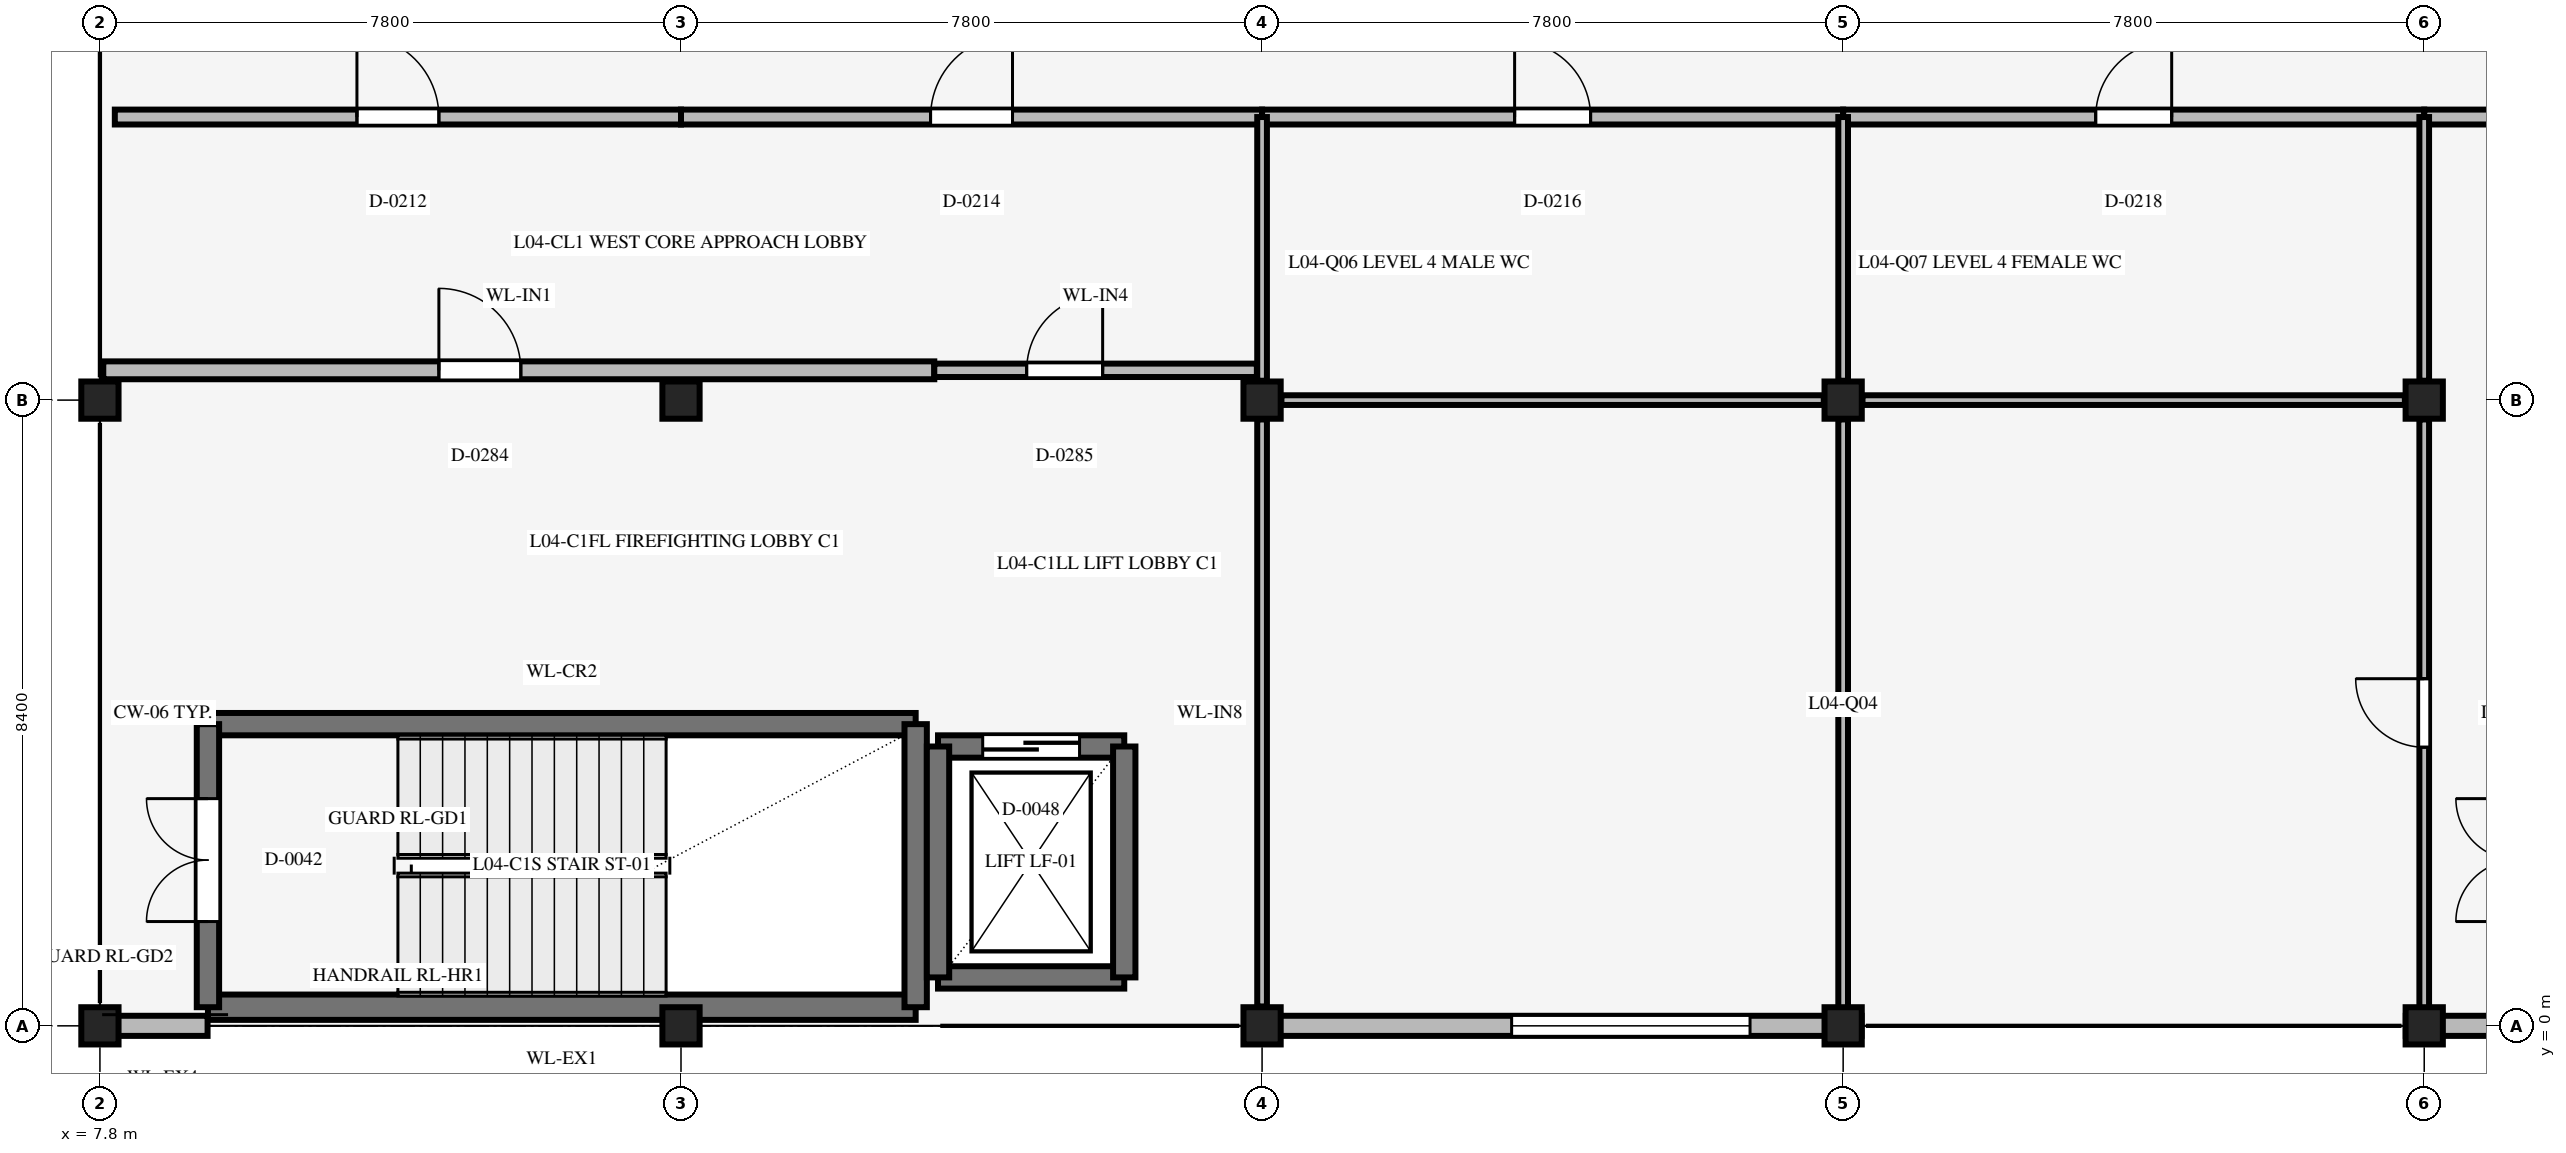
"""IFC4 building model, lengths in metres.
Left out: names, types, materials, properties, quantities, classifications, styles, units other than length and angle.
Written with IfcOpenShell. Run it as: python <this file> out.ifc"""

import sys

from ifc_helpers import new_model, si_unit, direction, frame, frame_2d, origin, origin_2d, place, context, subcontext, project, spatial, rectangle, extrude, element, fill, save


model = new_model("IFC4")
c1 = context("Model", 3, precision=1e-05, world=origin(), true_north=direction((0.0, 1.0)))
c2 = subcontext(c1, "Body", "Model", "MODEL_VIEW")
j1 = project(units=[si_unit("LENGTHUNIT", "METRE"), si_unit("PLANEANGLEUNIT", "RADIAN")], contexts=[c1])
p1 = place(None, origin())
s1 = spatial("IfcSite", under=j1, at=p1, CompositionType="ELEMENT")
p2 = place(p1, origin())
s2 = spatial("IfcBuilding", under=s1, at=p2, CompositionType="ELEMENT")
p3 = place(p2, frame((0.0, 0.0, 19.8)))
s3 = spatial("IfcBuildingStorey", under=s2, at=p3, CompositionType="ELEMENT", Elevation=19.8)
for number, where, z_axis, x_axis in (
    (1, (7.8, 0.0, 0.0), (0.0, 0.0, 1.0), (1.0, 0.0, 0.0)),
    (2, (7.8, 8.4, 0.0), (0.0, 0.0, 1.0), (1.0, 0.0, 0.0)),
    (3, (15.6, 0.0, 0.0), (0.0, 0.0, 1.0), (1.0, 0.0, 0.0)),
    (4, (15.6, 8.4, 0.0), (0.0, 0.0, 1.0), (1.0, 0.0, 0.0)),
    (5, (23.4, 0.0, 0.0), (0.0, 0.0, 1.0), (1.0, 0.0, 0.0)),
    (6, (23.4, 8.4, 0.0), (0.0, 0.0, 1.0), (1.0, 0.0, 0.0)),
    (7, (31.2, 0.0, 0.0), (0.0, 0.0, 1.0), (1.0, 0.0, 0.0)),
    (8, (31.2, 8.4, 0.0), (0.0, 0.0, 1.0), (1.0, 0.0, 0.0)),
    (9, (39.0, 0.0, 0.0), (0.0, 0.0, 1.0), (1.0, 0.0, 0.0)),
    (10, (39.0, 8.4, 0.0), (0.0, 0.0, 1.0), (1.0, 0.0, 0.0)),
):
    element("IfcColumn", number, at=place(p3, frame(where, z_axis=z_axis, x_axis=x_axis)), inside=s3, PredefinedType="COLUMN", context=c2, shape_type="SweptSolid", body=[
        extrude(rectangle(XDim=0.5, YDim=0.5, at=origin_2d()), origin(), (0.0, 0.0, 1.0), 3.9),
    ])
p4 = place(p3, frame((18.75, 0.25, 0.0), z_axis=(0.0, 0.0, 1.0), x_axis=(-1.0, 0.0, 0.0)))
e11 = element("IfcWall", 11, at=p4, inside=s3, PredefinedType="STANDARD", context=c2, shape_type="SweptSolid", body=[
    extrude(rectangle(XDim=9.5, YDim=0.34, at=frame_2d((4.75, 0.0))), origin(), (0.0, 0.0, 1.0), 3.9),
])
p5 = place(p3, frame((9.25, 4.05, 0.0), z_axis=(0.0, 0.0, 1.0), x_axis=(1.0, 0.0, 0.0)))
e12 = element("IfcWall", 12, at=p5, inside=s3, PredefinedType="SHEAR", context=c2, shape_type="SweptSolid", body=[
    extrude(rectangle(XDim=9.5, YDim=0.3, at=frame_2d((4.75, 0.0))), origin(), (0.0, 0.0, 1.0), 3.9),
])
p6 = place(p3, frame((9.25, 0.25, 0.0), z_axis=(0.0, 0.0, 1.0), x_axis=(0.0, 1.0, 0.0)))
e13 = element("IfcWall", 13, at=p6, inside=s3, PredefinedType="SHEAR", context=c2, shape_type="SweptSolid", body=[
    extrude(rectangle(XDim=3.8, YDim=0.3, at=frame_2d((1.9, 0.0))), origin(), (0.0, 0.0, 1.0), 3.9),
])
p7 = place(p6, frame((1.15, 0.0, 0.0)))
e14 = element("IfcOpeningElement", 14, at=p7, cuts=e13, PredefinedType="OPENING", context=c2, shape_type="SweptSolid", body=[
    extrude(rectangle(XDim=1.65, YDim=2.2, at=frame_2d((0.825, 1.1))), frame((0.0, 0.16, 0.0), z_axis=(0.0, -1.0, 0.0), x_axis=(1.0, 0.0, 0.0)), (0.0, 0.0, 1.0), 0.32),
])
p8 = place(p3, frame((18.75, 0.25, 0.0), z_axis=(0.0, 0.0, 1.0), x_axis=(0.0, 1.0, 0.0)))
e15 = element("IfcWall", 15, at=p8, inside=s3, PredefinedType="SHEAR", context=c2, shape_type="SweptSolid", body=[
    extrude(rectangle(XDim=3.8, YDim=0.3, at=frame_2d((1.9, 0.0))), origin(), (0.0, 0.0, 1.0), 3.9),
])
p9 = place(p3, frame((19.05, 0.65, 0.0), z_axis=(0.0, 0.0, 1.0), x_axis=(1.0, 0.0, 0.0)))
e16 = element("IfcWall", 16, at=p9, inside=s3, PredefinedType="SHEAR", context=c2, shape_type="SweptSolid", body=[
    extrude(rectangle(XDim=2.5, YDim=0.3, at=frame_2d((1.25, 0.0))), origin(), (0.0, 0.0, 1.0), 3.6),
])
p10 = place(p3, frame((19.05, 3.75, 0.0), z_axis=(0.0, 0.0, 1.0), x_axis=(1.0, 0.0, 0.0)))
e17 = element("IfcWall", 17, at=p10, inside=s3, PredefinedType="SHEAR", context=c2, shape_type="SweptSolid", body=[
    extrude(rectangle(XDim=2.5, YDim=0.3, at=frame_2d((1.25, 0.0))), origin(), (0.0, 0.0, 1.0), 3.6),
])
p11 = place(p10, frame((0.6, 0.0, 0.0)))
e18 = element("IfcOpeningElement", 18, at=p11, cuts=e17, PredefinedType="OPENING", context=c2, shape_type="SweptSolid", body=[
    extrude(rectangle(XDim=1.3, YDim=2.2, at=frame_2d((0.65, 1.1))), frame((0.0, 0.16, 0.0), z_axis=(0.0, -1.0, 0.0), x_axis=(1.0, 0.0, 0.0)), (0.0, 0.0, 1.0), 0.32),
])
for number, where, z_axis, x_axis in (
    (19, (19.05, 0.65, 0.0), (0.0, 0.0, 1.0), (0.0, 1.0, 0.0)),
    (20, (21.55, 0.65, 0.0), (0.0, 0.0, 1.0), (0.0, 1.0, 0.0)),
):
    element("IfcWall", number, at=place(p3, frame(where, z_axis=z_axis, x_axis=x_axis)), inside=s3, PredefinedType="SHEAR", context=c2, shape_type="SweptSolid", body=[
        extrude(rectangle(XDim=3.1, YDim=0.3, at=frame_2d((1.55, 0.0))), origin(), (0.0, 0.0, 1.0), 3.6),
    ])
p12 = place(p3, frame((9.245, 0.0, 0.0), z_axis=(0.0, 0.0, 1.0), x_axis=(-1.0, 0.0, 0.0)))
e21 = element("IfcWall", 21, at=p12, inside=s3, PredefinedType="STANDARD", context=c2, shape_type="SweptSolid", body=[
    extrude(rectangle(XDim=1.205, YDim=0.27, at=frame_2d((0.603, 0.0))), origin(), (0.0, 0.0, 1.0), 4.8),
])
p13 = place(p3, frame((31.448, 0.0, 0.0), z_axis=(0.0, 0.0, 1.0), x_axis=(-1.0, 0.0, 0.0)))
e22 = element("IfcWall", 22, at=p13, inside=s3, PredefinedType="STANDARD", context=c2, shape_type="SweptSolid", body=[
    extrude(rectangle(XDim=7.808, YDim=0.27, at=frame_2d((3.904, 0.0))), origin(), (0.0, 0.0, 1.0), 3.231),
])
p14 = place(p13, frame((1.498, 0.0, 0.9)))
e23 = element("IfcOpeningElement", 23, at=p14, cuts=e22, PredefinedType="OPENING", context=c2, shape_type="SweptSolid", body=[
    extrude(rectangle(XDim=3.2, YDim=2.1, at=frame_2d((1.6, 1.05))), frame((0.0, 0.145, 0.0), z_axis=(0.0, -1.0, 0.0), x_axis=(1.0, 0.0, 0.0)), (0.0, 0.0, 1.0), 0.29),
])
p15 = place(p3, frame((40.245, 0.0, 0.0), z_axis=(0.0, 0.0, 1.0), x_axis=(-1.0, 0.0, 0.0)))
e24 = element("IfcWall", 24, at=p15, inside=s3, PredefinedType="STANDARD", context=c2, shape_type="SweptSolid", body=[
    extrude(rectangle(XDim=1.493, YDim=0.27, at=frame_2d((0.746, 0.0))), origin(), (0.0, 0.0, 1.0), 4.8),
])
p16 = place(p3, frame((8.0, 12.2, 0.0), z_axis=(0.0, 0.0, 1.0), x_axis=(1.0, 0.0, 0.0)))
e25 = element("IfcWall", 25, at=p16, inside=s3, PredefinedType="STANDARD", context=c2, shape_type="SweptSolid", body=[
    extrude(rectangle(XDim=7.6, YDim=0.2, at=frame_2d((3.8, 0.0))), origin(), (0.0, 0.0, 1.0), 2.9),
])
p17 = place(p16, frame((3.25, 0.0, 0.0)))
e26 = element("IfcOpeningElement", 26, at=p17, cuts=e25, PredefinedType="OPENING", context=c2, shape_type="SweptSolid", body=[
    extrude(rectangle(XDim=1.1, YDim=2.2, at=frame_2d((0.55, 1.1))), frame((0.0, 0.11, 0.0), z_axis=(0.0, -1.0, 0.0), x_axis=(1.0, 0.0, 0.0)), (0.0, 0.0, 1.0), 0.22),
])
p18 = place(p3, frame((15.6, 12.2, 0.0), z_axis=(0.0, 0.0, 1.0), x_axis=(1.0, 0.0, 0.0)))
e27 = element("IfcWall", 27, at=p18, inside=s3, PredefinedType="STANDARD", context=c2, shape_type="SweptSolid", body=[
    extrude(rectangle(XDim=7.8, YDim=0.2, at=frame_2d((3.9, 0.0))), origin(), (0.0, 0.0, 1.0), 2.9),
])
p19 = place(p18, frame((3.35, 0.0, 0.0)))
e28 = element("IfcOpeningElement", 28, at=p19, cuts=e27, PredefinedType="OPENING", context=c2, shape_type="SweptSolid", body=[
    extrude(rectangle(XDim=1.1, YDim=2.2, at=frame_2d((0.55, 1.1))), frame((0.0, 0.11, 0.0), z_axis=(0.0, -1.0, 0.0), x_axis=(1.0, 0.0, 0.0)), (0.0, 0.0, 1.0), 0.22),
])
p20 = place(p3, frame((23.4, 12.2, 0.0), z_axis=(0.0, 0.0, 1.0), x_axis=(1.0, 0.0, 0.0)))
e29 = element("IfcWall", 29, at=p20, inside=s3, PredefinedType="STANDARD", context=c2, shape_type="SweptSolid", body=[
    extrude(rectangle(XDim=7.8, YDim=0.2, at=frame_2d((3.9, 0.0))), origin(), (0.0, 0.0, 1.0), 2.9),
])
p21 = place(p20, frame((3.39, 0.0, 0.0)))
e30 = element("IfcOpeningElement", 30, at=p21, cuts=e29, PredefinedType="OPENING", context=c2, shape_type="SweptSolid", body=[
    extrude(rectangle(XDim=1.02, YDim=2.15, at=frame_2d((0.51, 1.075))), frame((0.0, 0.11, 0.0), z_axis=(0.0, -1.0, 0.0), x_axis=(1.0, 0.0, 0.0)), (0.0, 0.0, 1.0), 0.22),
])
p22 = place(p3, frame((31.2, 12.2, 0.0), z_axis=(0.0, 0.0, 1.0), x_axis=(1.0, 0.0, 0.0)))
e31 = element("IfcWall", 31, at=p22, inside=s3, PredefinedType="STANDARD", context=c2, shape_type="SweptSolid", body=[
    extrude(rectangle(XDim=7.8, YDim=0.2, at=frame_2d((3.9, 0.0))), origin(), (0.0, 0.0, 1.0), 2.9),
])
p23 = place(p22, frame((3.39, 0.0, 0.0)))
e32 = element("IfcOpeningElement", 32, at=p23, cuts=e31, PredefinedType="OPENING", context=c2, shape_type="SweptSolid", body=[
    extrude(rectangle(XDim=1.02, YDim=2.15, at=frame_2d((0.51, 1.075))), frame((0.0, 0.11, 0.0), z_axis=(0.0, -1.0, 0.0), x_axis=(1.0, 0.0, 0.0)), (0.0, 0.0, 1.0), 0.22),
])
p24 = place(p3, frame((39.0, 12.2, 0.0), z_axis=(0.0, 0.0, 1.0), x_axis=(1.0, 0.0, 0.0)))
e33 = element("IfcWall", 33, at=p24, inside=s3, PredefinedType="STANDARD", context=c2, shape_type="SweptSolid", body=[
    extrude(rectangle(XDim=7.8, YDim=0.2, at=frame_2d((3.9, 0.0))), origin(), (0.0, 0.0, 1.0), 2.9),
])
p25 = place(p24, frame((3.39, 0.0, 0.0)))
e34 = element("IfcOpeningElement", 34, at=p25, cuts=e33, PredefinedType="OPENING", context=c2, shape_type="SweptSolid", body=[
    extrude(rectangle(XDim=1.02, YDim=2.15, at=frame_2d((0.51, 1.075))), frame((0.0, 0.11, 0.0), z_axis=(0.0, -1.0, 0.0), x_axis=(1.0, 0.0, 0.0)), (0.0, 0.0, 1.0), 0.22),
])
p26 = place(p3, frame((23.4, 0.26, 0.0), z_axis=(0.0, 0.0, 1.0), x_axis=(0.0, 1.0, 0.0)))
e35 = element("IfcWall", 35, at=p26, inside=s3, PredefinedType="STANDARD", context=c2, shape_type="SweptSolid", body=[
    extrude(rectangle(XDim=7.88, YDim=0.13, at=frame_2d((3.94, 0.0))), origin(), (0.0, 0.0, 1.0), 2.9),
])
p27 = place(p3, frame((23.4, 8.66, 0.0), z_axis=(0.0, 0.0, 1.0), x_axis=(0.0, 1.0, 0.0)))
e36 = element("IfcWall", 36, at=p27, inside=s3, PredefinedType="STANDARD", context=c2, shape_type="SweptSolid", body=[
    extrude(rectangle(XDim=3.54, YDim=0.13, at=frame_2d((1.77, 0.0))), origin(), (0.0, 0.0, 1.0), 2.9),
])
p28 = place(p3, frame((31.2, 0.14, 0.0), z_axis=(0.0, 0.0, 1.0), x_axis=(0.0, 1.0, 0.0)))
e37 = element("IfcWall", 37, at=p28, inside=s3, PredefinedType="STANDARD", context=c2, shape_type="SweptSolid", body=[
    extrude(rectangle(XDim=8.0, YDim=0.13, at=frame_2d((4.0, 0.0))), origin(), (0.0, 0.0, 1.0), 2.9),
])
p29 = place(p3, frame((31.2, 8.66, 0.0), z_axis=(0.0, 0.0, 1.0), x_axis=(0.0, 1.0, 0.0)))
e38 = element("IfcWall", 38, at=p29, inside=s3, PredefinedType="STANDARD", context=c2, shape_type="SweptSolid", body=[
    extrude(rectangle(XDim=3.54, YDim=0.13, at=frame_2d((1.77, 0.0))), origin(), (0.0, 0.0, 1.0), 2.9),
])
p30 = place(p3, frame((39.0, 0.14, 0.0), z_axis=(0.0, 0.0, 1.0), x_axis=(0.0, 1.0, 0.0)))
e39 = element("IfcWall", 39, at=p30, inside=s3, PredefinedType="STANDARD", context=c2, shape_type="SweptSolid", body=[
    extrude(rectangle(XDim=8.0, YDim=0.13, at=frame_2d((4.0, 0.0))), origin(), (0.0, 0.0, 1.0), 2.9),
])
p31 = place(p30, frame((3.6, 0.0, 0.0)))
e40 = element("IfcOpeningElement", 40, at=p31, cuts=e39, PredefinedType="OPENING", context=c2, shape_type="SweptSolid", body=[
    extrude(rectangle(XDim=0.92, YDim=2.15, at=frame_2d((0.46, 1.075))), frame((0.0, 0.075, 0.0), z_axis=(0.0, -1.0, 0.0), x_axis=(1.0, 0.0, 0.0)), (0.0, 0.0, 1.0), 0.15),
])
p32 = place(p3, frame((39.0, 8.66, 0.0), z_axis=(0.0, 0.0, 1.0), x_axis=(0.0, 1.0, 0.0)))
e41 = element("IfcWall", 41, at=p32, inside=s3, PredefinedType="STANDARD", context=c2, shape_type="SweptSolid", body=[
    extrude(rectangle(XDim=3.54, YDim=0.13, at=frame_2d((1.77, 0.0))), origin(), (0.0, 0.0, 1.0), 2.9),
])
for number, where, z_axis, x_axis in (
    (42, (23.66, 8.4, 0.0), (0.0, 0.0, 1.0), (1.0, 0.0, 0.0)),
    (43, (31.46, 8.4, 0.0), (0.0, 0.0, 1.0), (1.0, 0.0, 0.0)),
):
    element("IfcWall", number, at=place(p3, frame(where, z_axis=z_axis, x_axis=x_axis)), inside=s3, PredefinedType="STANDARD", context=c2, shape_type="SweptSolid", body=[
        extrude(rectangle(XDim=7.28, YDim=0.13, at=frame_2d((3.64, 0.0))), origin(), (0.0, 0.0, 1.0), 2.9),
    ])
p33 = place(p3, frame((7.845, 8.8, 0.0), z_axis=(0.0, 0.0, 1.0), x_axis=(1.0, 0.0, 0.0)))
e44 = element("IfcWall", 44, at=p33, inside=s3, PredefinedType="STANDARD", context=c2, shape_type="SweptSolid", body=[
    extrude(rectangle(XDim=11.155, YDim=0.24, at=frame_2d((5.578, 0.0))), origin(), (0.0, 0.0, 1.0), 2.9),
])
p34 = place(p33, frame((4.505, 0.0, 0.0)))
e45 = element("IfcOpeningElement", 45, at=p34, cuts=e44, PredefinedType="OPENING", context=c2, shape_type="SweptSolid", body=[
    extrude(rectangle(XDim=1.1, YDim=2.2, at=frame_2d((0.55, 1.1))), frame((0.0, 0.13, 0.0), z_axis=(0.0, -1.0, 0.0), x_axis=(1.0, 0.0, 0.0)), (0.0, 0.0, 1.0), 0.26),
])
p35 = place(p3, frame((19.0, 8.8, 0.0), z_axis=(0.0, 0.0, 1.0), x_axis=(1.0, 0.0, 0.0)))
e46 = element("IfcWall", 46, at=p35, inside=s3, PredefinedType="STANDARD", context=c2, shape_type="SweptSolid", body=[
    extrude(rectangle(XDim=4.33, YDim=0.18, at=frame_2d((2.165, 0.0))), origin(), (0.0, 0.0, 1.0), 2.9),
])
p36 = place(p35, frame((1.24, 0.0, 0.0)))
e47 = element("IfcOpeningElement", 47, at=p36, cuts=e46, PredefinedType="OPENING", context=c2, shape_type="SweptSolid", body=[
    extrude(rectangle(XDim=1.02, YDim=2.15, at=frame_2d((0.51, 1.075))), frame((0.0, 0.1, 0.0), z_axis=(0.0, -1.0, 0.0), x_axis=(1.0, 0.0, 0.0)), (0.0, 0.0, 1.0), 0.2),
])
p37 = place(p14, origin())
e48 = element("IfcWindow", 48, at=p37, inside=s3, PartitioningType="SINGLE_PANEL", PredefinedType="WINDOW", context=c2, shape_type="SweptSolid", body=[
    extrude(rectangle(XDim=3.2, YDim=2.1, at=frame_2d((1.6, 1.05))), frame((0.0, 0.03, 0.0), z_axis=(0.0, -1.0, 0.0), x_axis=(1.0, 0.0, 0.0)), (0.0, 0.0, 1.0), 0.06),
])
fill(e23, e48)
p38 = place(p7, origin())
e49 = element("IfcDoor", 49, at=p38, inside=s3, OperationType="DOUBLE_DOOR_SINGLE_SWING", PredefinedType="DOOR", context=c2, shape_type="SweptSolid", body=[
    extrude(rectangle(XDim=1.65, YDim=2.2, at=frame_2d((0.825, 1.1))), frame((0.0, 0.025, 0.0), z_axis=(0.0, -1.0, 0.0), x_axis=(1.0, 0.0, 0.0)), (0.0, 0.0, 1.0), 0.05),
])
fill(e14, e49)
p39 = place(p11, origin())
e50 = element("IfcDoor", 50, at=p39, inside=s3, OperationType="DOUBLE_DOOR_SLIDING", PredefinedType="DOOR", context=c2, shape_type="SweptSolid", body=[
    extrude(rectangle(XDim=1.3, YDim=2.2, at=frame_2d((0.65, 1.1))), frame((0.0, 0.025, 0.0), z_axis=(0.0, -1.0, 0.0), x_axis=(1.0, 0.0, 0.0)), (0.0, 0.0, 1.0), 0.05),
])
fill(e18, e50)
p40 = place(p17, origin())
e51 = element("IfcDoor", 51, at=p40, inside=s3, OperationType="SINGLE_SWING_LEFT", PredefinedType="DOOR", context=c2, shape_type="SweptSolid", body=[
    extrude(rectangle(XDim=1.1, YDim=2.2, at=frame_2d((0.55, 1.1))), frame((0.0, 0.025, 0.0), z_axis=(0.0, -1.0, 0.0), x_axis=(1.0, 0.0, 0.0)), (0.0, 0.0, 1.0), 0.05),
])
fill(e26, e51)
p41 = place(p19, origin())
e52 = element("IfcDoor", 52, at=p41, inside=s3, OperationType="SINGLE_SWING_RIGHT", PredefinedType="DOOR", context=c2, shape_type="SweptSolid", body=[
    extrude(rectangle(XDim=1.1, YDim=2.2, at=frame_2d((0.55, 1.1))), frame((0.0, 0.025, 0.0), z_axis=(0.0, -1.0, 0.0), x_axis=(1.0, 0.0, 0.0)), (0.0, 0.0, 1.0), 0.05),
])
fill(e28, e52)
p42 = place(p21, origin())
e53 = element("IfcDoor", 53, at=p42, inside=s3, OperationType="SINGLE_SWING_LEFT", PredefinedType="DOOR", context=c2, shape_type="SweptSolid", body=[
    extrude(rectangle(XDim=1.02, YDim=2.15, at=frame_2d((0.51, 1.075))), frame((0.0, 0.025, 0.0), z_axis=(0.0, -1.0, 0.0), x_axis=(1.0, 0.0, 0.0)), (0.0, 0.0, 1.0), 0.05),
])
fill(e30, e53)
p43 = place(p23, origin())
e54 = element("IfcDoor", 54, at=p43, inside=s3, OperationType="SINGLE_SWING_RIGHT", PredefinedType="DOOR", context=c2, shape_type="SweptSolid", body=[
    extrude(rectangle(XDim=1.02, YDim=2.15, at=frame_2d((0.51, 1.075))), frame((0.0, 0.025, 0.0), z_axis=(0.0, -1.0, 0.0), x_axis=(1.0, 0.0, 0.0)), (0.0, 0.0, 1.0), 0.05),
])
fill(e32, e54)
p44 = place(p31, origin())
e55 = element("IfcDoor", 55, at=p44, inside=s3, OperationType="SINGLE_SWING_RIGHT", PredefinedType="DOOR", context=c2, shape_type="SweptSolid", body=[
    extrude(rectangle(XDim=0.92, YDim=2.15, at=frame_2d((0.46, 1.075))), frame((0.0, 0.025, 0.0), z_axis=(0.0, -1.0, 0.0), x_axis=(1.0, 0.0, 0.0)), (0.0, 0.0, 1.0), 0.05),
])
fill(e40, e55)
p45 = place(p34, origin())
e56 = element("IfcDoor", 56, at=p45, inside=s3, OperationType="SINGLE_SWING_LEFT", PredefinedType="DOOR", context=c2, shape_type="SweptSolid", body=[
    extrude(rectangle(XDim=1.1, YDim=2.2, at=frame_2d((0.55, 1.1))), frame((0.0, 0.025, 0.0), z_axis=(0.0, -1.0, 0.0), x_axis=(1.0, 0.0, 0.0)), (0.0, 0.0, 1.0), 0.05),
])
fill(e45, e56)
p46 = place(p36, origin())
e57 = element("IfcDoor", 57, at=p46, inside=s3, OperationType="SINGLE_SWING_RIGHT", PredefinedType="DOOR", context=c2, shape_type="SweptSolid", body=[
    extrude(rectangle(XDim=1.02, YDim=2.15, at=frame_2d((0.51, 1.075))), frame((0.0, 0.025, 0.0), z_axis=(0.0, -1.0, 0.0), x_axis=(1.0, 0.0, 0.0)), (0.0, 0.0, 1.0), 0.05),
])
fill(e47, e57)
save(model, sys.argv[1])
